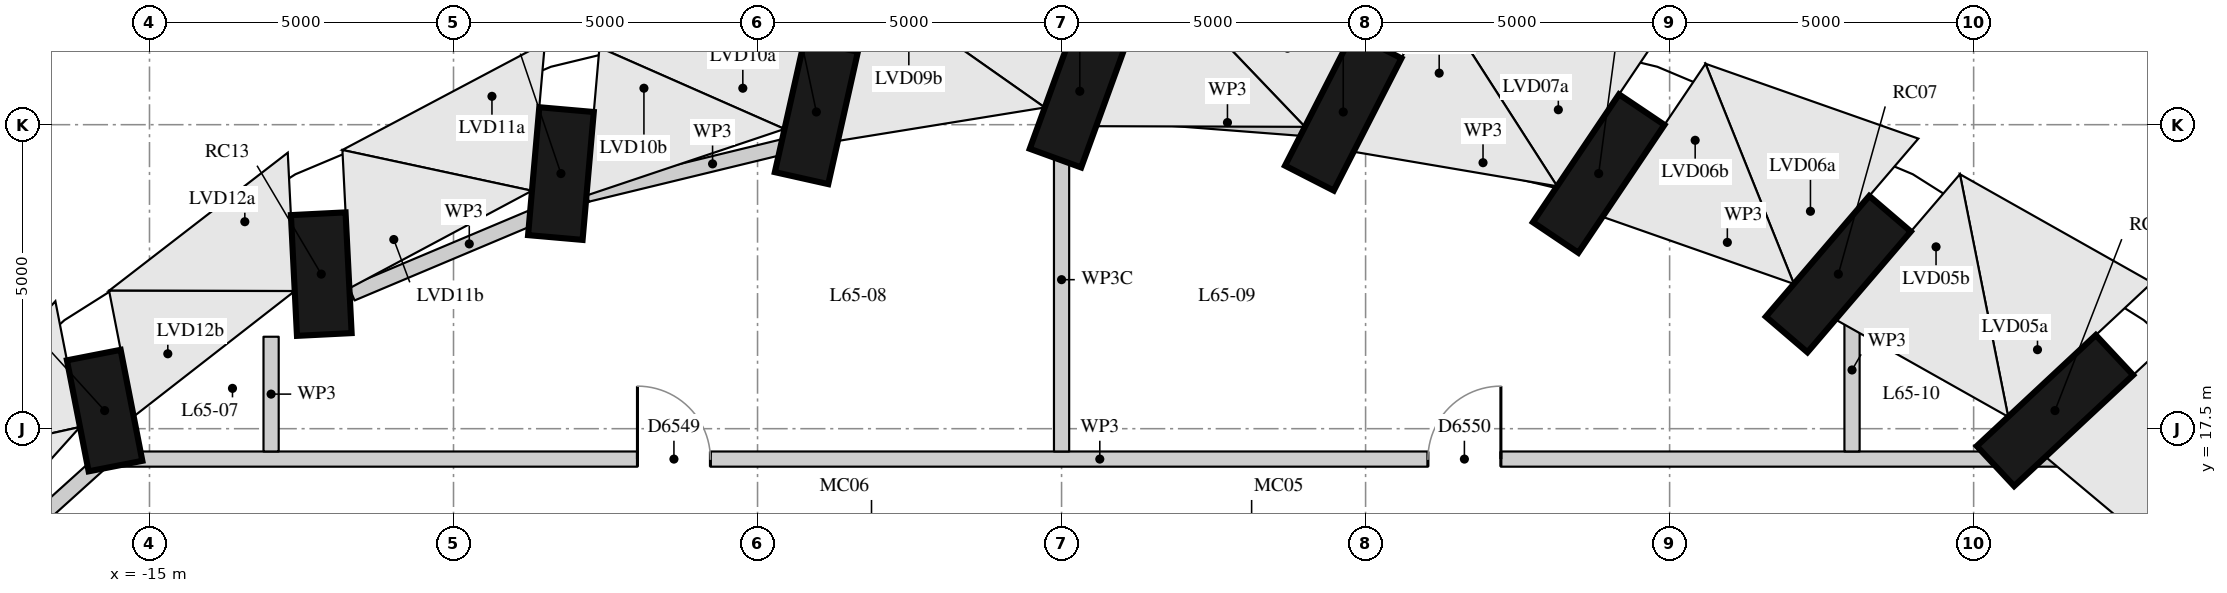
"""IFC4 building model, lengths in metres.
Left out: names, types, materials, properties, quantities, classifications, styles, units other than length and angle.
Written with IfcOpenShell. Run it as: python <this file> out.ifc"""

import sys

from ifc_helpers import new_model, si_unit, direction, frame, frame_2d, origin, origin_2d, place, context, subcontext, project, spatial, rectangle, extrude, element, fill, save


model = new_model("IFC4")
c1 = context("Model", 3, precision=1e-05, world=origin(), true_north=direction((0.0, 1.0)))
c2 = subcontext(c1, "Body", "Model", "MODEL_VIEW")
j1 = project(units=[si_unit("LENGTHUNIT", "METRE"), si_unit("PLANEANGLEUNIT", "RADIAN")], contexts=[c1])
p1 = place(None, origin())
s1 = spatial("IfcSite", under=j1, at=p1, CompositionType="ELEMENT")
p2 = place(p1, origin())
s2 = spatial("IfcBuilding", under=s1, at=p2, CompositionType="ELEMENT")
p3 = place(p2, frame((0.0, 0.0, 228.8)))
s3 = spatial("IfcBuildingStorey", under=s2, at=p3, CompositionType="ELEMENT", Elevation=228.8)
p4 = place(p3, frame((20.502, 15.845, 0.452), z_axis=(-0.483295497035, -0.361226015825, 0.797459232837), x_axis=(0.638756730742, 0.477421267822, 0.603372829984)))
e1 = element("IfcColumn", 1, at=p4, inside=s3, PredefinedType="COLUMN", context=c2, shape_type="SweptSolid", body=[
    extrude(rectangle(XDim=1.5, YDim=0.9, at=origin_2d()), origin(), (0.0, 0.0, 1.0), 4.508),
])
p5 = place(p3, frame((17.316, 18.71, 0.447), z_axis=(-0.435800460888, -0.406551378059, 0.802990619676), x_axis=(0.587162040533, 0.54775420897, 0.595991664969)))
e2 = element("IfcColumn", 2, at=p5, inside=s3, PredefinedType="COLUMN", context=c2, shape_type="SweptSolid", body=[
    extrude(rectangle(XDim=1.5, YDim=0.9, at=origin_2d()), origin(), (0.0, 0.0, 1.0), 4.491),
])
p6 = place(p3, frame((13.625, 21.035, 0.439), z_axis=(-0.380562477369, -0.444508779038, 0.810915622107), x_axis=(0.527381268549, 0.615997681619, 0.58516310019)))
e3 = element("IfcColumn", 3, at=p6, inside=s3, PredefinedType="COLUMN", context=c2, shape_type="SweptSolid", body=[
    extrude(rectangle(XDim=1.5, YDim=0.9, at=origin_2d()), origin(), (0.0, 0.0, 1.0), 4.467),
])
p7 = place(p3, frame((9.541, 22.748, 0.428), z_axis=(-0.318968433634, -0.47391481707, 0.820770299479), x_axis=(0.458286187964, 0.680909431884, 0.57125836142)))
e4 = element("IfcColumn", 4, at=p7, inside=s3, PredefinedType="COLUMN", context=c2, shape_type="SweptSolid", body=[
    extrude(rectangle(XDim=1.5, YDim=0.9, at=origin_2d()), origin(), (0.0, 0.0, 1.0), 4.438),
])
p8 = place(p3, frame((5.189, 23.797, 0.416), z_axis=(-0.252400241833, -0.49361223507, 0.832250610881), x_axis=(0.378896835448, 0.740998156137, 0.554399603796)))
e5 = element("IfcColumn", 5, at=p8, inside=s3, PredefinedType="COLUMN", context=c2, shape_type="SweptSolid", body=[
    extrude(rectangle(XDim=1.5, YDim=0.9, at=origin_2d()), origin(), (0.0, 0.0, 1.0), 4.408),
])
p9 = place(p3, frame((0.7, 24.15, 0.401), z_axis=(-0.182808037354, -0.502680263839, 0.844922347808), x_axis=(0.28876757697, 0.794044747049, 0.534888984906)))
e6 = element("IfcColumn", 6, at=p9, inside=s3, PredefinedType="COLUMN", context=c2, shape_type="SweptSolid", body=[
    extrude(rectangle(XDim=1.5, YDim=0.9, at=origin_2d()), origin(), (0.0, 0.0, 1.0), 4.376),
])
p10 = place(p3, frame((-3.789, 23.797, 0.385), z_axis=(-0.112126663966, -0.500637690011, 0.85836444158), x_axis=(0.187598355207, 0.837613497797, 0.51304043255)))
e7 = element("IfcColumn", 7, at=p10, inside=s3, PredefinedType="COLUMN", context=c2, shape_type="SweptSolid", body=[
    extrude(rectangle(XDim=1.5, YDim=0.9, at=origin_2d()), origin(), (0.0, 0.0, 1.0), 4.346),
])
p11 = place(p3, frame((-8.141, 22.748, 0.367), z_axis=(-0.042743243618, -0.487137284412, 0.872278786433), x_axis=(0.076244059248, 0.868940230793, 0.489008914785)))
e8 = element("IfcColumn", 8, at=p11, inside=s3, PredefinedType="COLUMN", context=c2, shape_type="SweptSolid", body=[
    extrude(rectangle(XDim=1.5, YDim=0.9, at=origin_2d()), origin(), (0.0, 0.0, 1.0), 4.318),
])
p12 = place(p3, frame((-12.225, 21.035, 0.347), z_axis=(0.023313963513, -0.462469427435, 0.88632865676), x_axis=(-0.044624845582, 0.885204558817, 0.463056705174)))
e9 = element("IfcColumn", 9, at=p12, inside=s3, PredefinedType="COLUMN", context=c2, shape_type="SweptSolid", body=[
    extrude(rectangle(XDim=1.5, YDim=0.9, at=origin_2d()), origin(), (0.0, 0.0, 1.0), 4.293),
])
p13 = place(p3, frame((-15.916, 18.71, 0.326), z_axis=(0.083530450962, -0.427250829204, 0.900266289887), x_axis=(-0.17273788383, 0.883538916062, 0.435339645902)))
e10 = element("IfcColumn", 10, at=p13, inside=s3, PredefinedType="COLUMN", context=c2, shape_type="SweptSolid", body=[
    extrude(rectangle(XDim=1.5, YDim=0.9, at=origin_2d()), origin(), (0.0, 0.0, 1.0), 4.273),
])
p14 = place(p3, frame((-15.827, 16.922, 0.0), z_axis=(0.0, 0.0, 1.0), x_axis=(-0.742562172492, -0.669777142029, 0.0)))
e11 = element("IfcWall", 11, at=p14, inside=s3, PredefinedType="PARTITIONING", context=c2, shape_type="SweptSolid", body=[
    extrude(rectangle(XDim=3.153, YDim=0.25, at=frame_2d((1.577, 0.0))), origin(), (0.0, 0.0, 1.0), 4.22),
])
p15 = place(p3, frame((19.387, 14.854, 0.0), z_axis=(0.0, 0.0, 1.0), x_axis=(-0.743960662193, 0.668223415565, 0.0)))
e12 = element("IfcWall", 12, at=p15, inside=s3, PredefinedType="PARTITIONING", context=c2, shape_type="SweptSolid", body=[
    extrude(rectangle(XDim=3.094, YDim=0.25, at=frame_2d((1.547, 0.0))), origin(), (0.0, 0.0, 1.0), 4.22),
])
p16 = place(p3, frame((-7.806, 21.354, 0.0), z_axis=(0.0, 0.0, 1.0), x_axis=(-0.92157517218, -0.388199951085, 0.0)))
e13 = element("IfcWall", 13, at=p16, inside=s3, PredefinedType="PARTITIONING", context=c2, shape_type="SweptSolid", body=[
    extrude(rectangle(XDim=4.199, YDim=0.25, at=frame_2d((2.1, 0.0))), origin(), (0.0, 0.0, 1.0), 4.22),
])
p17 = place(p3, frame((-3.673, 22.357, 0.0), z_axis=(0.0, 0.0, 1.0), x_axis=(-0.97180427763, -0.23578898613, 0.0)))
e14 = element("IfcWall", 14, at=p17, inside=s3, PredefinedType="PARTITIONING", context=c2, shape_type="SweptSolid", body=[
    extrude(rectangle(XDim=4.252, YDim=0.25, at=frame_2d((2.126, 0.0))), origin(), (0.0, 0.0, 1.0), 4.22),
])
p18 = place(p3, frame((4.863, 22.37, 0.0), z_axis=(0.0, 0.0, 1.0), x_axis=(-0.997041726215, 0.076862189577, 0.0)))
e15 = element("IfcWall", 15, at=p18, inside=s3, PredefinedType="PARTITIONING", context=c2, shape_type="SweptSolid", body=[
    extrude(rectangle(XDim=4.282, YDim=0.25, at=frame_2d((2.141, 0.0))), origin(), (0.0, 0.0, 1.0), 4.22),
])
p19 = place(p3, frame((9.0, 21.379, 0.0), z_axis=(0.0, 0.0, 1.0), x_axis=(-0.972491908443, 0.232936660945, 0.0)))
e16 = element("IfcWall", 16, at=p19, inside=s3, PredefinedType="PARTITIONING", context=c2, shape_type="SweptSolid", body=[
    extrude(rectangle(XDim=4.254, YDim=0.25, at=frame_2d((2.127, 0.0))), origin(), (0.0, 0.0, 1.0), 4.22),
])
p20 = place(p3, frame((12.899, 19.749, 0.0), z_axis=(0.0, 0.0, 1.0), x_axis=(-0.922566791686, 0.385837420267, 0.0)))
e17 = element("IfcWall", 17, at=p20, inside=s3, PredefinedType="PARTITIONING", context=c2, shape_type="SweptSolid", body=[
    extrude(rectangle(XDim=4.226, YDim=0.25, at=frame_2d((2.113, 0.0))), origin(), (0.0, 0.0, 1.0), 4.22),
])
p21 = place(p3, frame((-15.865, 17.0, 0.0), z_axis=(0.0, 0.0, 1.0), x_axis=(1.0, 0.0, 0.0)))
e18 = element("IfcWall", 18, at=p21, inside=s3, PredefinedType="PARTITIONING", context=c2, shape_type="SweptSolid", body=[
    extrude(rectangle(XDim=32.988, YDim=0.25, at=frame_2d((16.494, 0.0))), origin(), (0.0, 0.0, 1.0), 4.22),
])
p22 = place(p21, frame((8.89, 0.0, 0.0)))
e19 = element("IfcOpeningElement", 19, at=p22, cuts=e18, PredefinedType="OPENING", context=c2, shape_type="SweptSolid", body=[
    extrude(rectangle(XDim=1.2, YDim=2.1, at=frame_2d((0.6, 1.05))), frame((0.0, 0.135, 0.0), z_axis=(0.0, -1.0, 0.0), x_axis=(1.0, 0.0, 0.0)), (0.0, 0.0, 1.0), 0.27),
])
p23 = place(p21, frame((21.89, 0.0, 0.0)))
e20 = element("IfcOpeningElement", 20, at=p23, cuts=e18, PredefinedType="OPENING", context=c2, shape_type="SweptSolid", body=[
    extrude(rectangle(XDim=1.2, YDim=2.1, at=frame_2d((0.6, 1.05))), frame((0.0, 0.135, 0.0), z_axis=(0.0, -1.0, 0.0), x_axis=(1.0, 0.0, 0.0)), (0.0, 0.0, 1.0), 0.27),
])
p24 = place(p3, frame((-13.0, 17.125, 0.0), z_axis=(0.0, 0.0, 1.0), x_axis=(0.0, 1.0, 0.0)))
e21 = element("IfcWall", 21, at=p24, inside=s3, PredefinedType="PARTITIONING", context=c2, shape_type="SweptSolid", body=[
    extrude(rectangle(XDim=1.887, YDim=0.25, at=frame_2d((0.944, 0.0))), origin(), (0.0, 0.0, 1.0), 4.22),
])
p25 = place(p3, frame((0.0, 17.125, 0.0), z_axis=(0.0, 0.0, 1.0), x_axis=(0.0, 1.0, 0.0)))
e22 = element("IfcWall", 22, at=p25, inside=s3, PredefinedType="PARTITIONING", context=c2, shape_type="SweptSolid", body=[
    extrude(rectangle(XDim=5.652, YDim=0.25, at=frame_2d((2.826, 0.0))), origin(), (0.0, 0.0, 1.0), 3.77),
])
p26 = place(p3, frame((13.0, 17.125, 0.0), z_axis=(0.0, 0.0, 1.0), x_axis=(0.0, 1.0, 0.0)))
e23 = element("IfcWall", 23, at=p26, inside=s3, PredefinedType="PARTITIONING", context=c2, shape_type="SweptSolid", body=[
    extrude(rectangle(XDim=2.681, YDim=0.25, at=frame_2d((1.34, 0.0))), origin(), (0.0, 0.0, 1.0), 4.22),
])
p27 = place(p22, origin())
e24 = element("IfcDoor", 24, at=p27, inside=s3, OperationType="SINGLE_SWING_LEFT", PredefinedType="DOOR", context=c2, shape_type="SweptSolid", body=[
    extrude(rectangle(XDim=1.2, YDim=2.1, at=frame_2d((0.6, 1.05))), frame((0.0, 0.025, 0.0), z_axis=(0.0, -1.0, 0.0), x_axis=(1.0, 0.0, 0.0)), (0.0, 0.0, 1.0), 0.05),
])
fill(e19, e24)
p28 = place(p23, origin())
e25 = element("IfcDoor", 25, at=p28, inside=s3, OperationType="SINGLE_SWING_RIGHT", PredefinedType="DOOR", context=c2, shape_type="SweptSolid", body=[
    extrude(rectangle(XDim=1.2, YDim=2.1, at=frame_2d((0.6, 1.05))), frame((0.0, 0.025, 0.0), z_axis=(0.0, -1.0, 0.0), x_axis=(1.0, 0.0, 0.0)), (0.0, 0.0, 1.0), 0.05),
])
fill(e20, e25)
save(model, sys.argv[1])
